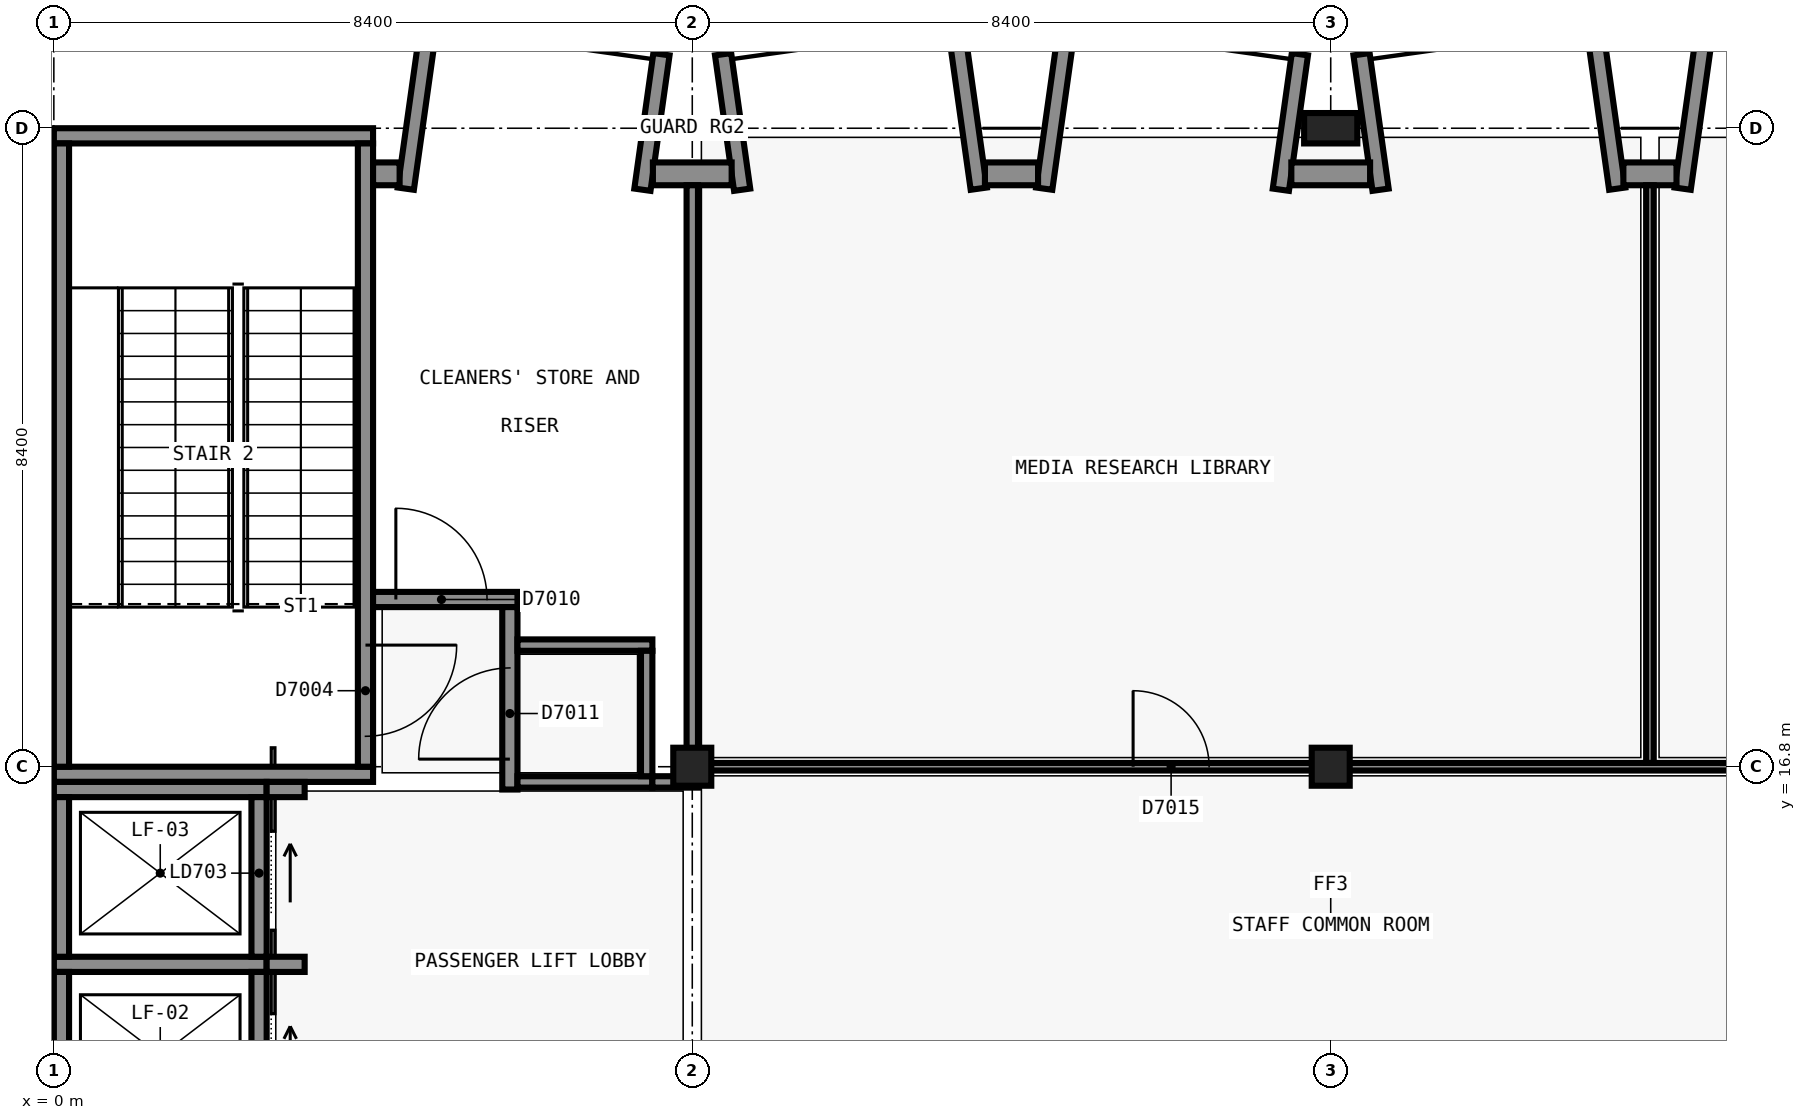
"""IFC4 building model, lengths in metres.
Left out: names, types, materials, properties, quantities, classifications, styles, units other than length and angle.
Written with IfcOpenShell. Run it as: python <this file> out.ifc"""

import sys

from ifc_helpers import new_model, si_unit, direction, frame, frame_2d, origin, origin_2d, place, context, subcontext, project, spatial, rectangle, extrude, element, fill, save


model = new_model("IFC4")
c1 = context("Model", 3, precision=1e-05, world=origin(), true_north=direction((0.0, 1.0)))
c2 = subcontext(c1, "Body", "Model", "MODEL_VIEW")
j1 = project(units=[si_unit("LENGTHUNIT", "METRE"), si_unit("PLANEANGLEUNIT", "RADIAN")], contexts=[c1])
p1 = place(None, origin())
s1 = spatial("IfcSite", under=j1, at=p1, CompositionType="ELEMENT")
p2 = place(p1, origin())
s2 = spatial("IfcBuilding", under=s1, at=p2, CompositionType="ELEMENT")
p3 = place(p2, frame((0.0, 0.0, 33.6)))
s3 = spatial("IfcBuildingStorey", under=s2, at=p3, CompositionType="ELEMENT", Elevation=33.6)
for number, where, z_axis, x_axis in (
    (1, (4.2, 16.7, 0.0), (0.0, 0.0, 1.0), (-1.0, 0.0, 0.0)),
    (2, (0.0, 25.1, 0.0), (0.0, 0.0, 1.0), (1.0, 0.0, 0.0)),
):
    element("IfcWall", number, at=place(p3, frame(where, z_axis=z_axis, x_axis=x_axis)), inside=s3, PredefinedType="SHEAR", context=c2, shape_type="SweptSolid", body=[
        extrude(rectangle(XDim=4.199, YDim=0.2, at=frame_2d((2.1, 0.0))), origin(), (0.0, 0.0, 1.0), 4.5),
    ])
p4 = place(p3, frame((0.1, 16.8, 0.0), z_axis=(0.0, 0.0, 1.0), x_axis=(0.0, 1.0, 0.0)))
e3 = element("IfcWall", 3, at=p4, inside=s3, PredefinedType="SHEAR", context=c2, shape_type="SweptSolid", body=[
    extrude(rectangle(XDim=8.2, YDim=0.2, at=frame_2d((4.1, 0.0))), origin(), (0.0, 0.0, 1.0), 4.5),
])
p5 = place(p3, frame((4.1, 25.0, 0.0), z_axis=(0.0, 0.0, 1.0), x_axis=(0.0, -1.0, 0.0)))
e4 = element("IfcWall", 4, at=p5, inside=s3, PredefinedType="SHEAR", context=c2, shape_type="SweptSolid", body=[
    extrude(rectangle(XDim=8.2, YDim=0.2, at=frame_2d((4.1, 0.0))), origin(), (0.0, 0.0, 1.0), 4.5),
])
p6 = place(p5, frame((6.6, 0.0, 0.0)))
e5 = element("IfcOpeningElement", 5, at=p6, cuts=e4, PredefinedType="OPENING", context=c2, shape_type="SweptSolid", body=[
    extrude(rectangle(XDim=1.2, YDim=2.1, at=frame_2d((0.6, 1.05))), frame((0.0, 0.11, 0.0), z_axis=(0.0, -1.0, 0.0), x_axis=(1.0, 0.0, 0.0)), (0.0, 0.0, 1.0), 0.22),
])
p7 = place(p3, frame((0.0, 14.2, 0.0), z_axis=(0.0, 0.0, 1.0), x_axis=(1.0, 0.0, 0.0)))
e6 = element("IfcWall", 6, at=p7, inside=s3, PredefinedType="SHEAR", context=c2, shape_type="SweptSolid", body=[
    extrude(rectangle(XDim=2.8, YDim=0.2, at=frame_2d((1.4, 0.0))), origin(), (0.0, 0.0, 1.0), 4.5),
])
p8 = place(p3, frame((0.1, 11.9, 0.0), z_axis=(0.0, 0.0, 1.0), x_axis=(0.0, 1.0, 0.0)))
e7 = element("IfcWall", 7, at=p8, inside=s3, PredefinedType="SHEAR", context=c2, shape_type="SweptSolid", body=[
    extrude(rectangle(XDim=2.2, YDim=0.2, at=frame_2d((1.1, 0.0))), origin(), (0.0, 0.0, 1.0), 4.5),
])
p9 = place(p3, frame((2.7, 14.1, 0.0), z_axis=(0.0, 0.0, 1.0), x_axis=(0.0, -1.0, 0.0)))
e8 = element("IfcWall", 8, at=p9, inside=s3, PredefinedType="SHEAR", context=c2, shape_type="SweptSolid", body=[
    extrude(rectangle(XDim=2.2, YDim=0.2, at=frame_2d((1.1, 0.0))), origin(), (0.0, 0.0, 1.0), 4.5),
])
p10 = place(p9, frame((0.55, 0.0, 0.0)))
e9 = element("IfcOpeningElement", 9, at=p10, cuts=e8, PredefinedType="OPENING", context=c2, shape_type="SweptSolid", body=[
    extrude(rectangle(XDim=1.1, YDim=2.1, at=frame_2d((0.55, 1.05))), frame((0.0, 0.11, 0.0), z_axis=(0.0, -1.0, 0.0), x_axis=(1.0, 0.0, 0.0)), (0.0, 0.0, 1.0), 0.22),
])
p11 = place(p3, frame((0.0, 16.5, 0.0), z_axis=(0.0, 0.0, 1.0), x_axis=(1.0, 0.0, 0.0)))
e10 = element("IfcWall", 10, at=p11, inside=s3, PredefinedType="SHEAR", context=c2, shape_type="SweptSolid", body=[
    extrude(rectangle(XDim=2.8, YDim=0.2, at=frame_2d((1.4, 0.0))), origin(), (0.0, 0.0, 1.0), 4.5),
])
p12 = place(p3, frame((0.1, 14.3, 0.0), z_axis=(0.0, 0.0, 1.0), x_axis=(0.0, 1.0, 0.0)))
e11 = element("IfcWall", 11, at=p12, inside=s3, PredefinedType="SHEAR", context=c2, shape_type="SweptSolid", body=[
    extrude(rectangle(XDim=2.1, YDim=0.2, at=frame_2d((1.05, 0.0))), origin(), (0.0, 0.0, 1.0), 4.5),
])
p13 = place(p3, frame((2.7, 16.4, 0.0), z_axis=(0.0, 0.0, 1.0), x_axis=(0.0, -1.0, 0.0)))
e12 = element("IfcWall", 12, at=p13, inside=s3, PredefinedType="SHEAR", context=c2, shape_type="SweptSolid", body=[
    extrude(rectangle(XDim=2.1, YDim=0.2, at=frame_2d((1.05, 0.0))), origin(), (0.0, 0.0, 1.0), 4.5),
])
p14 = place(p13, frame((0.45, 0.0, 0.0)))
e13 = element("IfcOpeningElement", 13, at=p14, cuts=e12, PredefinedType="OPENING", context=c2, shape_type="SweptSolid", body=[
    extrude(rectangle(XDim=1.1, YDim=2.1, at=frame_2d((0.55, 1.05))), frame((0.0, 0.11, 0.0), z_axis=(0.0, -1.0, 0.0), x_axis=(1.0, 0.0, 0.0)), (0.0, 0.0, 1.0), 0.22),
])
for number, where, z_axis, x_axis in (
    (14, (8.4, 16.8, 0.0), (0.0, 0.0, 1.0), (1.0, 0.0, 0.0)),
    (15, (16.8, 16.8, 0.0), (0.0, 0.0, 1.0), (1.0, 0.0, 0.0)),
):
    element("IfcColumn", number, at=place(p3, frame(where, z_axis=z_axis, x_axis=x_axis)), inside=s3, PredefinedType="COLUMN", context=c2, shape_type="SweptSolid", body=[
        extrude(rectangle(XDim=0.5, YDim=0.5, at=origin_2d()), origin(), (0.0, 0.0, 1.0), 4.5),
    ])
p15 = place(p3, frame((16.8, 25.2, 0.0), z_axis=(0.0, 0.0, 1.0), x_axis=(1.0, 0.0, 0.0)))
e16 = element("IfcColumn", 16, at=p15, inside=s3, PredefinedType="COLUMN", context=c2, shape_type="SweptSolid", body=[
    extrude(rectangle(XDim=0.7, YDim=0.4, at=origin_2d()), origin(), (0.0, 0.0, 1.0), 4.5),
])
for number, where, z_axis, x_axis in (
    (17, (2.8, 14.2, 0.0), (0.0, 0.0, 1.0), (1.0, 0.0, 0.0)),
    (18, (2.8, 16.5, 0.0), (0.0, 0.0, 1.0), (1.0, 0.0, 0.0)),
):
    element("IfcWall", number, at=place(p3, frame(where, z_axis=z_axis, x_axis=x_axis)), inside=s3, PredefinedType="SHEAR", context=c2, shape_type="SweptSolid", body=[
        extrude(rectangle(XDim=0.5, YDim=0.2, at=frame_2d((0.25, 0.0))), origin(), (0.0, 0.0, 1.0), 4.5),
    ])
p16 = place(p3, frame((4.631, 24.405, 0.0), z_axis=(0.0, 0.0, 1.0), x_axis=(0.139141913905, 0.990272451295, 0.0)))
e19 = element("IfcWall", 19, at=p16, inside=s3, PredefinedType="SOLIDWALL", context=c2, shape_type="SweptSolid", body=[
    extrude(rectangle(XDim=2.219, YDim=0.215, at=frame_2d((1.11, 0.0))), origin(), (0.0, 0.0, 1.0), 4.2),
])
for number, where, z_axis, x_axis in (
    (20, (7.744, 24.391, 0.0), (0.0, 0.0, 1.0), (0.139, 0.99, 0.0)),
    (21, (9.056, 24.391, 0.0), (0.0, 0.0, 1.0), (-0.139, 0.99, 0.0)),
):
    element("IfcWall", number, at=place(p3, frame(where, z_axis=z_axis, x_axis=x_axis)), inside=s3, PredefinedType="SOLIDWALL", context=c2, shape_type="SweptSolid", body=[
        extrude(rectangle(XDim=1.8, YDim=0.215, at=frame_2d((0.9, 0.0))), origin(), (0.0, 0.0, 1.0), 4.2),
    ])
p17 = place(p3, frame((12.169, 24.405, 0.0), z_axis=(0.0, 0.0, 1.0), x_axis=(-0.139141913905, 0.990272451295, 0.0)))
e22 = element("IfcWall", 22, at=p17, inside=s3, PredefinedType="SOLIDWALL", context=c2, shape_type="SweptSolid", body=[
    extrude(rectangle(XDim=2.219, YDim=0.215, at=frame_2d((1.11, 0.0))), origin(), (0.0, 0.0, 1.0), 4.2),
])
p18 = place(p3, frame((13.031, 24.405, 0.0), z_axis=(0.0, 0.0, 1.0), x_axis=(0.139249775508, 0.99025728981, 0.0)))
e23 = element("IfcWall", 23, at=p18, inside=s3, PredefinedType="SOLIDWALL", context=c2, shape_type="SweptSolid", body=[
    extrude(rectangle(XDim=2.22, YDim=0.215, at=frame_2d((1.11, 0.0))), origin(), (0.0, 0.0, 1.0), 4.2),
])
for number, where, z_axis, x_axis in (
    (24, (16.144, 24.391, 0.0), (0.0, 0.0, 1.0), (0.139, 0.99, 0.0)),
    (25, (17.456, 24.391, 0.0), (0.0, 0.0, 1.0), (-0.139, 0.99, 0.0)),
):
    element("IfcWall", number, at=place(p3, frame(where, z_axis=z_axis, x_axis=x_axis)), inside=s3, PredefinedType="SOLIDWALL", context=c2, shape_type="SweptSolid", body=[
        extrude(rectangle(XDim=1.8, YDim=0.215, at=frame_2d((0.9, 0.0))), origin(), (0.0, 0.0, 1.0), 4.2),
    ])
for number, where, z_axis, x_axis in (
    (26, (20.569, 24.405, 0.0), (0.0, 0.0, 1.0), (-0.139, 0.99, 0.0)),
    (27, (21.431, 24.405, 0.0), (0.0, 0.0, 1.0), (0.139, 0.99, 0.0)),
):
    element("IfcWall", number, at=place(p3, frame(where, z_axis=z_axis, x_axis=x_axis)), inside=s3, PredefinedType="SOLIDWALL", context=c2, shape_type="SweptSolid", body=[
        extrude(rectangle(XDim=2.219, YDim=0.215, at=frame_2d((1.11, 0.0))), origin(), (0.0, 0.0, 1.0), 4.2),
    ])
p19 = place(p3, frame((4.2, 24.6, 0.0), z_axis=(0.0, 0.0, 1.0), x_axis=(1.0, 0.0, 0.0)))
e28 = element("IfcWall", 28, at=p19, inside=s3, PredefinedType="SOLIDWALL", context=c2, shape_type="SweptSolid", body=[
    extrude(rectangle(XDim=0.349, YDim=0.3, at=frame_2d((0.175, 0.0))), origin(), (0.0, 0.0, 1.0), 4.2),
])
p20 = place(p3, frame((7.882, 24.6, 0.0), z_axis=(0.0, 0.0, 1.0), x_axis=(1.0, 0.0, 0.0)))
e29 = element("IfcWall", 29, at=p20, inside=s3, PredefinedType="SOLIDWALL", context=c2, shape_type="SweptSolid", body=[
    extrude(rectangle(XDim=1.036, YDim=0.3, at=frame_2d((0.518, 0.0))), origin(), (0.0, 0.0, 1.0), 4.2),
])
p21 = place(p3, frame((12.25, 24.6, 0.0), z_axis=(0.0, 0.0, 1.0), x_axis=(1.0, 0.0, 0.0)))
e30 = element("IfcWall", 30, at=p21, inside=s3, PredefinedType="SOLIDWALL", context=c2, shape_type="SweptSolid", body=[
    extrude(rectangle(XDim=0.699, YDim=0.3, at=frame_2d((0.35, 0.0))), origin(), (0.0, 0.0, 1.0), 4.2),
])
p22 = place(p3, frame((16.282, 24.6, 0.0), z_axis=(0.0, 0.0, 1.0), x_axis=(1.0, 0.0, 0.0)))
e31 = element("IfcWall", 31, at=p22, inside=s3, PredefinedType="SOLIDWALL", context=c2, shape_type="SweptSolid", body=[
    extrude(rectangle(XDim=1.036, YDim=0.3, at=frame_2d((0.518, 0.0))), origin(), (0.0, 0.0, 1.0), 4.2),
])
p23 = place(p3, frame((20.65, 24.6, 0.0), z_axis=(0.0, 0.0, 1.0), x_axis=(1.0, 0.0, 0.0)))
e32 = element("IfcWall", 32, at=p23, inside=s3, PredefinedType="SOLIDWALL", context=c2, shape_type="SweptSolid", body=[
    extrude(rectangle(XDim=0.699, YDim=0.3, at=frame_2d((0.35, 0.0))), origin(), (0.0, 0.0, 1.0), 4.2),
])
p24 = place(p3, frame((4.2, 19.0, 0.0), z_axis=(0.0, 0.0, 1.0), x_axis=(1.0, 0.0, 0.0)))
e33 = element("IfcWall", 33, at=p24, inside=s3, PredefinedType="SOLIDWALL", context=c2, shape_type="SweptSolid", body=[
    extrude(rectangle(XDim=1.9, YDim=0.2, at=frame_2d((0.95, 0.0))), origin(), (0.0, 0.0, 1.0), 4.2),
])
p25 = place(p24, frame((0.3, 0.0, 0.0)))
e34 = element("IfcOpeningElement", 34, at=p25, cuts=e33, PredefinedType="OPENING", context=c2, shape_type="SweptSolid", body=[
    extrude(rectangle(XDim=1.2, YDim=2.1, at=frame_2d((0.6, 1.05))), frame((0.0, 0.11, 0.0), z_axis=(0.0, -1.0, 0.0), x_axis=(1.0, 0.0, 0.0)), (0.0, 0.0, 1.0), 0.22),
])
p26 = place(p3, frame((6.0, 16.5, 0.0), z_axis=(0.0, 0.0, 1.0), x_axis=(0.0, 1.0, 0.0)))
e35 = element("IfcWall", 35, at=p26, inside=s3, PredefinedType="SOLIDWALL", context=c2, shape_type="SweptSolid", body=[
    extrude(rectangle(XDim=2.4, YDim=0.2, at=frame_2d((1.2, 0.0))), origin(), (0.0, 0.0, 1.0), 3.7),
])
p27 = place(p26, frame((0.4, 0.0, 0.0)))
e36 = element("IfcOpeningElement", 36, at=p27, cuts=e35, PredefinedType="OPENING", context=c2, shape_type="SweptSolid", body=[
    extrude(rectangle(XDim=1.2, YDim=2.1, at=frame_2d((0.6, 1.05))), frame((0.0, 0.11, 0.0), z_axis=(0.0, -1.0, 0.0), x_axis=(1.0, 0.0, 0.0)), (0.0, 0.0, 1.0), 0.22),
])
p28 = place(p3, frame((6.1, 16.6, 0.0), z_axis=(0.0, 0.0, 1.0), x_axis=(1.0, 0.0, 0.0)))
e37 = element("IfcWall", 37, at=p28, inside=s3, PredefinedType="PARTITIONING", context=c2, shape_type="SweptSolid", body=[
    extrude(rectangle(XDim=1.775, YDim=0.15, at=frame_2d((0.887, 0.0))), origin(), (0.0, 0.0, 1.0), 3.7),
])
p29 = place(p3, frame((7.875, 16.6, 0.0), z_axis=(0.0, 0.0, 1.0), x_axis=(1.0, 0.0, 0.0)))
e38 = element("IfcWall", 38, at=p29, inside=s3, PredefinedType="SOLIDWALL", context=c2, shape_type="SweptSolid", body=[
    extrude(rectangle(XDim=0.6, YDim=0.15, at=frame_2d((0.3, 0.0))), origin(), (0.0, 0.0, 1.0), 3.5),
])
p30 = place(p3, frame((6.1, 18.4, 0.0), z_axis=(0.0, 0.0, 1.0), x_axis=(1.0, 0.0, 0.0)))
e39 = element("IfcWall", 39, at=p30, inside=s3, PredefinedType="SOLIDWALL", context=c2, shape_type="SweptSolid", body=[
    extrude(rectangle(XDim=1.775, YDim=0.15, at=frame_2d((0.887, 0.0))), origin(), (0.0, 0.0, 1.0), 4.2),
])
p31 = place(p3, frame((7.8, 16.675, 0.0), z_axis=(0.0, 0.0, 1.0), x_axis=(0.0, 1.0, 0.0)))
e40 = element("IfcWall", 40, at=p31, inside=s3, PredefinedType="SOLIDWALL", context=c2, shape_type="SweptSolid", body=[
    extrude(rectangle(XDim=1.65, YDim=0.15, at=frame_2d((0.825, 0.0))), origin(), (0.0, 0.0, 1.0), 3.7),
])
p32 = place(p3, frame((8.4, 16.675, 0.0), z_axis=(0.0, 0.0, 1.0), x_axis=(0.0, 1.0, 0.0)))
e41 = element("IfcWall", 41, at=p32, inside=s3, PredefinedType="SOLIDWALL", context=c2, shape_type="SweptSolid", body=[
    extrude(rectangle(XDim=7.775, YDim=0.15, at=frame_2d((3.887, 0.0))), origin(), (0.0, 0.0, 1.0), 3.5),
])
p33 = place(p3, frame((8.475, 16.8, 0.0), z_axis=(0.0, 0.0, 1.0), x_axis=(1.0, 0.0, 0.0)))
e42 = element("IfcWall", 42, at=p33, inside=s3, PredefinedType="PARTITIONING", context=c2, shape_type="SweptSolid", body=[
    extrude(rectangle(XDim=16.65, YDim=0.1, at=frame_2d((8.325, 0.0))), origin(), (0.0, 0.0, 1.0), 3.5),
])
p34 = place(p33, frame((5.725, 0.0, 0.0)))
e43 = element("IfcOpeningElement", 43, at=p34, cuts=e42, PredefinedType="OPENING", context=c2, shape_type="SweptSolid", body=[
    extrude(rectangle(XDim=1.0, YDim=2.1, at=frame_2d((0.5, 1.05))), frame((0.0, 0.06, 0.0), z_axis=(0.0, -1.0, 0.0), x_axis=(1.0, 0.0, 0.0)), (0.0, 0.0, 1.0), 0.12),
])
p35 = place(p3, frame((21.0, 16.85, 0.0), z_axis=(0.0, 0.0, 1.0), x_axis=(0.0, 1.0, 0.0)))
e44 = element("IfcWall", 44, at=p35, inside=s3, PredefinedType="PARTITIONING", context=c2, shape_type="SweptSolid", body=[
    extrude(rectangle(XDim=7.6, YDim=0.1, at=frame_2d((3.8, 0.0))), origin(), (0.0, 0.0, 1.0), 3.5),
])
p36 = place(p10, origin())
e45 = element("IfcDoor", 45, at=p36, inside=s3, OperationType="SLIDING_TO_LEFT", PredefinedType="DOOR", context=c2, shape_type="SweptSolid", body=[
    extrude(rectangle(XDim=1.1, YDim=2.1, at=frame_2d((0.55, 1.05))), frame((0.0, 0.025, 0.0), z_axis=(0.0, -1.0, 0.0), x_axis=(1.0, 0.0, 0.0)), (0.0, 0.0, 1.0), 0.05),
])
fill(e9, e45)
p37 = place(p14, origin())
e46 = element("IfcDoor", 46, at=p37, inside=s3, OperationType="SLIDING_TO_LEFT", PredefinedType="DOOR", context=c2, shape_type="SweptSolid", body=[
    extrude(rectangle(XDim=1.1, YDim=2.1, at=frame_2d((0.55, 1.05))), frame((0.0, 0.025, 0.0), z_axis=(0.0, -1.0, 0.0), x_axis=(1.0, 0.0, 0.0)), (0.0, 0.0, 1.0), 0.05),
])
fill(e13, e46)
p38 = place(p6, origin())
e47 = element("IfcDoor", 47, at=p38, inside=s3, OperationType="SINGLE_SWING_RIGHT", PredefinedType="DOOR", context=c2, shape_type="SweptSolid", body=[
    extrude(rectangle(XDim=1.2, YDim=2.1, at=frame_2d((0.6, 1.05))), frame((0.0, 0.025, 0.0), z_axis=(0.0, -1.0, 0.0), x_axis=(1.0, 0.0, 0.0)), (0.0, 0.0, 1.0), 0.05),
])
fill(e5, e47)
p39 = place(p25, origin())
e48 = element("IfcDoor", 48, at=p39, inside=s3, OperationType="SINGLE_SWING_LEFT", PredefinedType="DOOR", context=c2, shape_type="SweptSolid", body=[
    extrude(rectangle(XDim=1.2, YDim=2.1, at=frame_2d((0.6, 1.05))), frame((0.0, 0.025, 0.0), z_axis=(0.0, -1.0, 0.0), x_axis=(1.0, 0.0, 0.0)), (0.0, 0.0, 1.0), 0.05),
])
fill(e34, e48)
p40 = place(p27, origin())
e49 = element("IfcDoor", 49, at=p40, inside=s3, OperationType="SINGLE_SWING_RIGHT", PredefinedType="DOOR", context=c2, shape_type="SweptSolid", body=[
    extrude(rectangle(XDim=1.2, YDim=2.1, at=frame_2d((0.6, 1.05))), frame((0.0, 0.025, 0.0), z_axis=(0.0, -1.0, 0.0), x_axis=(1.0, 0.0, 0.0)), (0.0, 0.0, 1.0), 0.05),
])
fill(e36, e49)
p41 = place(p34, origin())
e50 = element("IfcDoor", 50, at=p41, inside=s3, OperationType="SINGLE_SWING_LEFT", PredefinedType="DOOR", context=c2, shape_type="SweptSolid", body=[
    extrude(rectangle(XDim=1.0, YDim=2.1, at=frame_2d((0.5, 1.05))), frame((0.0, 0.025, 0.0), z_axis=(0.0, -1.0, 0.0), x_axis=(1.0, 0.0, 0.0)), (0.0, 0.0, 1.0), 0.05),
])
fill(e43, e50)
save(model, sys.argv[1])
